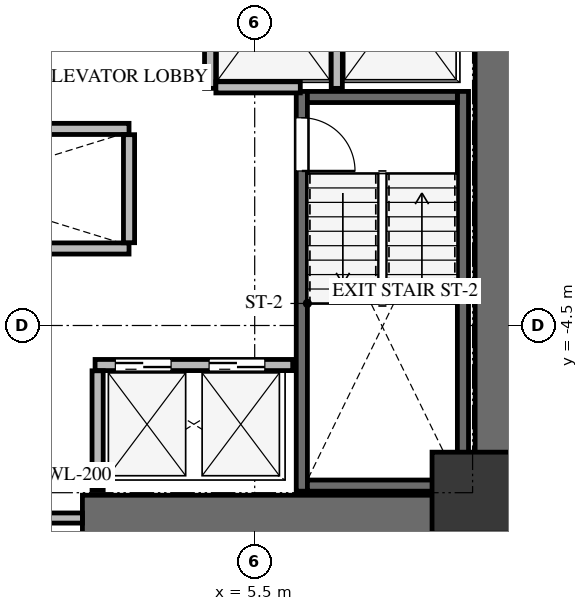
"""IFC4 building model, lengths in metres.
Left out: names, types, materials, properties, quantities, classifications, styles, units other than length and angle.
Written with IfcOpenShell. Run it as: python <this file> out.ifc"""

import sys

from ifc_helpers import new_model, si_unit, direction, frame, frame_2d, origin, origin_2d, place, context, subcontext, project, spatial, rectangle, extrude, source, transform, mapped, element, fill, save


model = new_model("IFC4")
c1 = context("Model", 3, precision=1e-05, world=origin(), true_north=direction((0.0, 1.0)))
c2 = subcontext(c1, "Body", "Model", "MODEL_VIEW")
j1 = project(units=[si_unit("LENGTHUNIT", "METRE"), si_unit("PLANEANGLEUNIT", "RADIAN")], contexts=[c1])
p1 = place(None, origin())
s1 = spatial("IfcSite", under=j1, at=p1, CompositionType="ELEMENT")
p2 = place(p1, origin())
s2 = spatial("IfcBuilding", under=s1, at=p2, CompositionType="ELEMENT")
p3 = place(p2, frame((0.0, 0.0, 55.5)))
s3 = spatial("IfcBuildingStorey", under=s2, at=p3, CompositionType="ELEMENT", Elevation=55.5)
p4 = place(p3, frame((10.3, -8.75, 0.0), z_axis=(0.0, 0.0, 1.0), x_axis=(0.0, 1.0, 0.0)))
e1 = element("IfcWall", 1, at=p4, inside=s3, PredefinedType="SHEAR", context=c2, shape_type="SweptSolid", body=[
    extrude(rectangle(XDim=17.5, YDim=0.9, at=frame_2d((8.75, 0.0))), origin(), (0.0, 0.0, 1.0), 3.3),
])
p5 = place(p3, frame((2.1, -8.3, 0.0), z_axis=(0.0, 0.0, 1.0), x_axis=(1.0, 0.0, 0.0)))
e2 = element("IfcWall", 2, at=p5, inside=s3, PredefinedType="SHEAR", context=c2, shape_type="SweptSolid", body=[
    extrude(rectangle(XDim=7.75, YDim=0.9, at=frame_2d((3.875, 0.0))), origin(), (0.0, 0.0, 1.0), 3.3),
])
p6 = place(p3, frame((9.61, -7.77, -0.24), z_axis=(0.0, 0.0, 1.0), x_axis=(0.0, 1.0, 0.0)))
e3 = element("IfcWall", 3, at=p6, inside=s3, PredefinedType="SHEAR", context=c2, shape_type="SweptSolid", body=[
    extrude(rectangle(XDim=7.89, YDim=0.22, at=frame_2d((3.945, 0.0))), origin(), (0.0, 0.0, 1.0), 3.3),
])
p7 = place(p3, frame((6.43, 0.12, -0.24), z_axis=(0.0, 0.0, 1.0), x_axis=(0.0, -1.0, 0.0)))
e4 = element("IfcWall", 4, at=p7, inside=s3, PredefinedType="SHEAR", context=c2, shape_type="SweptSolid", body=[
    extrude(rectangle(XDim=7.89, YDim=0.22, at=frame_2d((3.945, 0.0))), origin(), (0.0, 0.0, 1.0), 3.3),
])
p8 = place(p7, frame((0.52, 0.0, 0.0)))
e5 = element("IfcOpeningElement", 5, at=p8, cuts=e4, PredefinedType="OPENING", context=c2, shape_type="SweptSolid", body=[
    extrude(rectangle(XDim=1.05, YDim=2.15, at=frame_2d((0.525, 1.075))), frame((0.0, 0.12, 0.0), z_axis=(0.0, -1.0, 0.0), x_axis=(1.0, 0.0, 0.0)), (0.0, 0.0, 1.0), 0.24),
])
for number, where, z_axis, x_axis in (
    (6, (6.54, -7.66, -0.24), (0.0, 0.0, 1.0), (1.0, 0.0, 0.0)),
    (7, (9.5, 0.01, -0.24), (0.0, 0.0, 1.0), (-1.0, 0.0, 0.0)),
):
    element("IfcWall", number, at=place(p3, frame(where, z_axis=z_axis, x_axis=x_axis)), inside=s3, PredefinedType="SHEAR", context=c2, shape_type="SweptSolid", body=[
        extrude(rectangle(XDim=2.96, YDim=0.22, at=frame_2d((1.48, 0.0))), origin(), (0.0, 0.0, 1.0), 3.3),
    ])
m1 = source(origin(), c2, "Body", "SweptSolid", [
    extrude(rectangle(XDim=1.6, YDim=1.6, at=origin_2d()), origin(), (0.0, 0.0, 1.0), 3.3),
])
p9 = place(p3, frame((9.8, -7.8, -0.24), z_axis=(0.0, 0.0, 1.0), x_axis=(1.0, 0.0, 0.0)))
e8 = element("IfcColumn", 8, at=p9, inside=s3, PredefinedType="COLUMN", context=c2, shape_type="MappedRepresentation", body=[
    mapped(m1, transform((0.0, 0.0, 0.0), x_axis=(1.0, 0.0, 0.0), y_axis=(0.0, 1.0, 0.0), z_axis=(0.0, 0.0, 1.0), scale=1.0)),
])
p10 = place(p3, frame((-2.1, -8.3, 0.0), z_axis=(0.0, 0.0, 1.0), x_axis=(1.0, 0.0, 0.0)))
e9 = element("IfcWall", 9, at=p10, inside=s3, PredefinedType="SOLIDWALL", context=c2, shape_type="SweptSolid", body=[
    extrude(rectangle(XDim=4.2, YDim=0.2, at=frame_2d((2.1, 0.0))), origin(), (0.0, 0.0, 1.0), 3.045),
])
p11 = place(p10, frame((1.2, 0.0, 0.0)))
e10 = element("IfcOpeningElement", 10, at=p11, cuts=e9, PredefinedType="OPENING", context=c2, shape_type="SweptSolid", body=[
    extrude(rectangle(XDim=1.8, YDim=2.15, at=frame_2d((0.9, 1.075))), frame((0.0, 0.11, 0.0), z_axis=(0.0, -1.0, 0.0), x_axis=(1.0, 0.0, 0.0)), (0.0, 0.0, 1.0), 0.22),
])
for number, where, z_axis, x_axis in (
    (11, (4.62, 0.18, 0.0), (0.0, 0.0, 1.0), (0.0, 1.0, 0.0)),
    (12, (7.12, 0.18, 0.0), (0.0, 0.0, 1.0), (0.0, 1.0, 0.0)),
):
    element("IfcWall", number, at=place(p3, frame(where, z_axis=z_axis, x_axis=x_axis)), inside=s3, PredefinedType="SOLIDWALL", context=c2, shape_type="SweptSolid", body=[
        extrude(rectangle(XDim=3.186, YDim=0.22, at=frame_2d((1.593, 0.0))), origin(), (0.0, 0.0, 1.0), 3.045),
    ])
p12 = place(p3, frame((4.734, 0.2, 0.0), z_axis=(0.0, 0.0, 1.0), x_axis=(1.0, 0.0, 0.0)))
e13 = element("IfcWall", 13, at=p12, inside=s3, PredefinedType="SOLIDWALL", context=c2, shape_type="SweptSolid", body=[
    extrude(rectangle(XDim=1.666, YDim=0.22, at=frame_2d((0.833, 0.0))), origin(), (0.0, 0.0, 1.0), 3.045),
])
p13 = place(p3, frame((2.35, -5.28, 0.0), z_axis=(0.0, 0.0, 1.0), x_axis=(1.0, 0.0, 0.0)))
e14 = element("IfcWall", 14, at=p13, inside=s3, PredefinedType="SOLIDWALL", context=c2, shape_type="SweptSolid", body=[
    extrude(rectangle(XDim=3.9, YDim=0.22, at=frame_2d((1.95, 0.0))), origin(), (0.0, 0.0, 1.0), 3.045),
])
p14 = place(p13, frame((0.4, 0.0, 0.0)))
e15 = element("IfcOpeningElement", 15, at=p14, cuts=e14, PredefinedType="OPENING", context=c2, shape_type="SweptSolid", body=[
    extrude(rectangle(XDim=1.1, YDim=2.15, at=frame_2d((0.55, 1.075))), frame((0.0, 0.12, 0.0), z_axis=(0.0, -1.0, 0.0), x_axis=(1.0, 0.0, 0.0)), (0.0, 0.0, 1.0), 0.24),
])
p15 = place(p13, frame((2.25, 0.0, 0.0)))
e16 = element("IfcOpeningElement", 16, at=p15, cuts=e14, PredefinedType="OPENING", context=c2, shape_type="SweptSolid", body=[
    extrude(rectangle(XDim=1.1, YDim=2.15, at=frame_2d((0.55, 1.075))), frame((0.0, 0.12, 0.0), z_axis=(0.0, -1.0, 0.0), x_axis=(1.0, 0.0, 0.0)), (0.0, 0.0, 1.0), 0.24),
])
p16 = place(p3, frame((2.4, -7.75, 0.0), z_axis=(0.0, 0.0, 1.0), x_axis=(0.0, 1.0, 0.0)))
e17 = element("IfcWall", 17, at=p16, inside=s3, PredefinedType="SOLIDWALL", context=c2, shape_type="SweptSolid", body=[
    extrude(rectangle(XDim=2.356, YDim=0.22, at=frame_2d((1.178, 0.0))), origin(), (0.0, 0.0, 1.0), 3.045),
])
for number, where, z_axis, x_axis in (
    (18, (-4.22, -2.98, 0.0), (0.0, 0.0, 1.0), (1.0, 0.0, 0.0)),
    (19, (-4.22, -0.62, 0.0), (0.0, 0.0, 1.0), (1.0, 0.0, 0.0)),
):
    element("IfcWall", number, at=place(p3, frame(where, z_axis=z_axis, x_axis=x_axis)), inside=s3, PredefinedType="SOLIDWALL", context=c2, shape_type="SweptSolid", body=[
        extrude(rectangle(XDim=7.24, YDim=0.22, at=frame_2d((3.62, 0.0))), origin(), (0.0, 0.0, 1.0), 3.045),
    ])
p17 = place(p3, frame((3.02, -2.866, 0.0), z_axis=(0.0, 0.0, 1.0), x_axis=(0.0, 1.0, 0.0)))
e20 = element("IfcWall", 20, at=p17, inside=s3, PredefinedType="SOLIDWALL", context=c2, shape_type="SweptSolid", body=[
    extrude(rectangle(XDim=2.132, YDim=0.22, at=frame_2d((1.066, 0.0))), origin(), (0.0, 0.0, 1.0), 3.045),
])
m2 = source(origin(), c2, "Body", "SweptSolid", [
    extrude(rectangle(XDim=1.05, YDim=2.15, at=frame_2d((0.525, 1.075))), frame((0.0, 0.025, 0.0), z_axis=(0.0, -1.0, 0.0), x_axis=(1.0, 0.0, 0.0)), (0.0, 0.0, 1.0), 0.05),
])
p18 = place(p8, origin())
e21 = element("IfcDoor", 21, at=p18, inside=s3, OperationType="SINGLE_SWING_RIGHT", PredefinedType="DOOR", context=c2, shape_type="MappedRepresentation", body=[
    mapped(m2, transform((0.0, 0.0, 0.0), x_axis=(1.0, 0.0, 0.0), y_axis=(0.0, 1.0, 0.0), z_axis=(0.0, 0.0, 1.0), scale=1.0)),
])
fill(e5, e21)
m3 = source(origin(), c2, "Body", "SweptSolid", [
    extrude(rectangle(XDim=1.1, YDim=2.15, at=frame_2d((0.55, 1.075))), frame((0.0, 0.025, 0.0), z_axis=(0.0, -1.0, 0.0), x_axis=(1.0, 0.0, 0.0)), (0.0, 0.0, 1.0), 0.05),
])
p19 = place(p14, origin())
e22 = element("IfcDoor", 22, at=p19, inside=s3, OperationType="DOUBLE_DOOR_SLIDING", PredefinedType="DOOR", context=c2, shape_type="MappedRepresentation", body=[
    mapped(m3, transform((0.0, 0.0, 0.0), x_axis=(1.0, 0.0, 0.0), y_axis=(0.0, 1.0, 0.0), z_axis=(0.0, 0.0, 1.0), scale=1.0)),
])
fill(e15, e22)
p20 = place(p15, origin())
e23 = element("IfcDoor", 23, at=p20, inside=s3, OperationType="DOUBLE_DOOR_SLIDING", PredefinedType="DOOR", context=c2, shape_type="MappedRepresentation", body=[
    mapped(m3, transform((0.0, 0.0, 0.0), x_axis=(1.0, 0.0, 0.0), y_axis=(0.0, 1.0, 0.0), z_axis=(0.0, 0.0, 1.0), scale=1.0)),
])
fill(e16, e23)
save(model, sys.argv[1])
